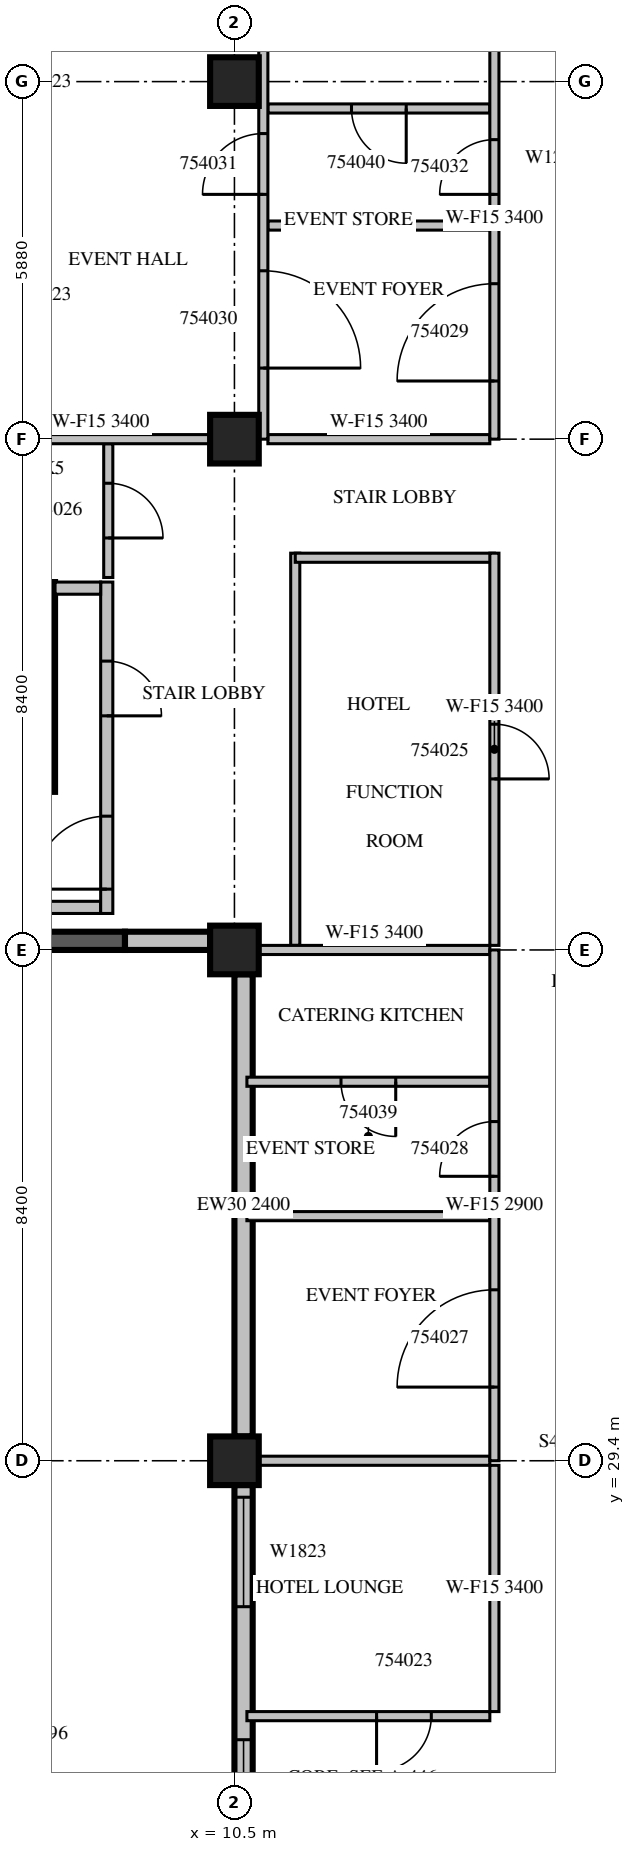
"""IFC4 building model, lengths in metres.
Left out: names, types, materials, properties, quantities, classifications, styles, units other than length and angle.
Written with IfcOpenShell. Run it as: python <this file> out.ifc"""

import sys

from ifc_helpers import new_model, si_unit, direction, frame, frame_2d, origin, origin_2d, place, context, subcontext, project, spatial, rectangle, extrude, source, transform, mapped, element, fill, save


model = new_model("IFC4")
c1 = context("Model", 3, precision=1e-05, world=origin(), true_north=direction((0.0, 1.0)))
c2 = subcontext(c1, "Body", "Model", "MODEL_VIEW")
j1 = project(units=[si_unit("LENGTHUNIT", "METRE"), si_unit("PLANEANGLEUNIT", "RADIAN")], contexts=[c1])
p1 = place(None, origin())
s1 = spatial("IfcSite", under=j1, at=p1, CompositionType="ELEMENT")
p2 = place(p1, origin())
s2 = spatial("IfcBuilding", under=s1, at=p2, CompositionType="ELEMENT")
p3 = place(p2, frame((0.0, 0.0, 238.6)))
s3 = spatial("IfcBuildingStorey", under=s2, at=p3, CompositionType="ELEMENT", Elevation=238.6)
m1 = source(origin(), c2, "Body", "SweptSolid", [
    extrude(rectangle(XDim=0.8, YDim=0.8, at=origin_2d()), origin(), (0.0, 0.0, 1.0), 3.8),
])
for number, where, z_axis, x_axis in (
    (1, (10.5, 29.4, 0.0), (0.0, 0.0, 1.0), (1.0, 0.0, 0.0)),
    (2, (10.5, 37.8, 0.0), (0.0, 0.0, 1.0), (1.0, 0.0, 0.0)),
    (3, (10.5, 46.2, 0.0), (0.0, 0.0, 1.0), (1.0, 0.0, 0.0)),
    (4, (10.5, 52.08, 0.0), (0.0, 0.0, 1.0), (1.0, 0.0, 0.0)),
):
    element("IfcColumn", number, at=place(p3, frame(where, z_axis=z_axis, x_axis=x_axis)), inside=s3, PredefinedType="COLUMN", context=c2, shape_type="MappedRepresentation", body=[
        mapped(m1, transform((0.0, 0.0, 0.0), scale=1.0)),
    ])
m2 = source(origin(), c2, "Body", "SweptSolid", [
    extrude(rectangle(XDim=2.1, YDim=0.3, at=frame_2d((1.05, 0.0))), origin(), (0.0, 0.0, 1.0), 3.4),
])
p4 = place(p3, frame((6.6, 37.95, 0.0), z_axis=(0.0, 0.0, 1.0), x_axis=(1.0, 0.0, 0.0)))
e5 = element("IfcWall", 5, at=p4, inside=s3, PredefinedType="SOLIDWALL", context=c2, shape_type="MappedRepresentation", body=[
    mapped(m2, transform((0.0, 0.0, 0.0), scale=1.0)),
])
m3 = source(origin(), c2, "Body", "SweptSolid", [
    extrude(rectangle(XDim=1.4, YDim=0.3, at=frame_2d((0.7, 0.0))), origin(), (0.0, 0.0, 1.0), 3.4),
])
p5 = place(p3, frame((8.7, 37.95, 0.0), z_axis=(0.0, 0.0, 1.0), x_axis=(1.0, 0.0, 0.0)))
e6 = element("IfcWall", 6, at=p5, inside=s3, PredefinedType="STANDARD", context=c2, shape_type="MappedRepresentation", body=[
    mapped(m3, transform((0.0, 0.0, 0.0), scale=1.0)),
])
m4 = source(origin(), c2, "Body", "SweptSolid", [
    extrude(rectangle(XDim=7.6, YDim=0.3, at=frame_2d((3.8, 0.0))), origin(), (0.0, 0.0, 1.0), 2.4),
])
p6 = place(p3, frame((10.65, 37.4, 0.0), z_axis=(0.0, 0.0, 1.0), x_axis=(0.0, -1.0, 0.0)))
e7 = element("IfcWall", 7, at=p6, inside=s3, PredefinedType="STANDARD", context=c2, shape_type="MappedRepresentation", body=[
    mapped(m4, transform((0.0, 0.0, 0.0), scale=1.0)),
])
m5 = source(origin(), c2, "Body", "SweptSolid", [
    extrude(rectangle(XDim=7.2, YDim=0.3, at=frame_2d((3.6, 0.0))), origin(), (0.0, 0.0, 1.0), 3.4),
])
p7 = place(p3, frame((10.65, 29.0, 0.0), z_axis=(0.0, 0.0, 1.0), x_axis=(0.0, -1.0, 0.0)))
e8 = element("IfcWall", 8, at=p7, inside=s3, PredefinedType="STANDARD", context=c2, shape_type="MappedRepresentation", body=[
    mapped(m5, transform((0.0, 0.0, 0.0), scale=1.0)),
])
m6 = source(origin(), c2, "Body", "SweptSolid", [
    extrude(rectangle(XDim=1.8, YDim=2.3, at=frame_2d((0.9, 1.15))), frame((0.0, 0.16, 0.0), z_axis=(0.0, -1.0, 0.0), x_axis=(1.0, 0.0, 0.0)), (0.0, 0.0, 1.0), 0.32),
])
p8 = place(p7, frame((0.2, 0.0, 0.6)))
e9 = element("IfcOpeningElement", 9, at=p8, cuts=e8, PredefinedType="OPENING", context=c2, shape_type="MappedRepresentation", body=[
    mapped(m6, transform((0.0, 0.0, 0.0), scale=1.0)),
])
m7 = source(origin(), c2, "Body", "SweptSolid", [
    extrude(rectangle(XDim=2.4, YDim=2.3, at=frame_2d((1.2, 1.15))), frame((0.0, 0.16, 0.0), z_axis=(0.0, -1.0, 0.0), x_axis=(1.0, 0.0, 0.0)), (0.0, 0.0, 1.0), 0.32),
])
p9 = place(p7, frame((4.188, 0.0, 0.6)))
e10 = element("IfcOpeningElement", 10, at=p9, cuts=e8, PredefinedType="OPENING", context=c2, shape_type="MappedRepresentation", body=[
    mapped(m7, transform((0.0, 0.0, 0.0), scale=1.0)),
])
m8 = source(origin(), c2, "Body", "SweptSolid", [
    extrude(rectangle(XDim=3.45, YDim=0.25, at=frame_2d((1.725, 0.0))), origin(), (0.0, 0.0, 1.0), 3.4),
])
p10 = place(p3, frame((7.425, 40.4, 0.0), z_axis=(0.0, 0.0, 1.0), x_axis=(0.0, 1.0, 0.0)))
e11 = element("IfcWall", 11, at=p10, inside=s3, PredefinedType="SOLIDWALL", context=c2, shape_type="MappedRepresentation", body=[
    mapped(m8, transform((0.0, 0.0, 0.0), scale=1.0)),
])
m9 = source(origin(), c2, "Body", "SweptSolid", [
    extrude(rectangle(XDim=2.0, YDim=0.2, at=frame_2d((1.0, 0.0))), origin(), (0.0, 0.0, 1.0), 3.4),
])
p11 = place(p3, frame((6.3, 38.5, 0.0), z_axis=(0.0, 0.0, 1.0), x_axis=(1.0, 0.0, 0.0)))
e12 = element("IfcWall", 12, at=p11, inside=s3, PredefinedType="PARTITIONING", context=c2, shape_type="MappedRepresentation", body=[
    mapped(m9, transform((0.0, 0.0, 0.0), scale=1.0)),
])
m10 = source(origin(), c2, "Body", "SweptSolid", [
    extrude(rectangle(XDim=5.45, YDim=0.2, at=frame_2d((2.725, 0.0))), origin(), (0.0, 0.0, 1.0), 3.4),
])
p12 = place(p3, frame((8.4, 38.4, 0.0), z_axis=(0.0, 0.0, 1.0), x_axis=(0.0, 1.0, 0.0)))
e13 = element("IfcWall", 13, at=p12, inside=s3, PredefinedType="PARTITIONING", context=c2, shape_type="MappedRepresentation", body=[
    mapped(m10, transform((0.0, 0.0, 0.0), scale=1.0)),
])
m11 = source(origin(), c2, "Body", "SweptSolid", [
    extrude(rectangle(XDim=1.2, YDim=2.1, at=frame_2d((0.6, 1.05))), frame((0.0, 0.11, 0.0), z_axis=(0.0, -1.0, 0.0), x_axis=(1.0, 0.0, 0.0)), (0.0, 0.0, 1.0), 0.22),
])
p13 = place(p12, frame((0.4, 0.0, 0.0)))
e14 = element("IfcOpeningElement", 14, at=p13, cuts=e13, PredefinedType="OPENING", context=c2, shape_type="MappedRepresentation", body=[
    mapped(m11, transform((0.0, 0.0, 0.0), scale=1.0)),
])
m12 = source(origin(), c2, "Body", "SweptSolid", [
    extrude(rectangle(XDim=0.9, YDim=2.1, at=frame_2d((0.45, 1.05))), frame((0.0, 0.11, 0.0), z_axis=(0.0, -1.0, 0.0), x_axis=(1.0, 0.0, 0.0)), (0.0, 0.0, 1.0), 0.22),
])
p14 = place(p12, frame((3.25, 0.0, 0.0)))
e15 = element("IfcOpeningElement", 15, at=p14, cuts=e13, PredefinedType="OPENING", context=c2, shape_type="MappedRepresentation", body=[
    mapped(m12, transform((0.0, 0.0, 0.0), scale=1.0)),
])
m13 = source(origin(), c2, "Body", "SweptSolid", [
    extrude(rectangle(XDim=0.75, YDim=0.2, at=frame_2d((0.375, 0.0))), origin(), (0.0, 0.0, 1.0), 3.4),
])
p15 = place(p3, frame((7.55, 43.75, 0.0), z_axis=(0.0, 0.0, 1.0), x_axis=(1.0, 0.0, 0.0)))
e16 = element("IfcWall", 16, at=p15, inside=s3, PredefinedType="PARTITIONING", context=c2, shape_type="MappedRepresentation", body=[
    mapped(m13, transform((0.0, 0.0, 0.0), scale=1.0)),
])
m14 = source(origin(), c2, "Body", "SweptSolid", [
    extrude(rectangle(XDim=3.995, YDim=0.15, at=frame_2d((1.998, 0.0))), origin(), (0.0, 0.0, 1.0), 3.4),
])
p16 = place(p3, frame((10.705, 25.2, 0.0), z_axis=(0.0, 0.0, 1.0), x_axis=(1.0, 0.0, 0.0)))
e17 = element("IfcWall", 17, at=p16, inside=s3, PredefinedType="PARTITIONING", context=c2, shape_type="MappedRepresentation", body=[
    mapped(m14, transform((0.0, 0.0, 0.0), scale=1.0)),
])
m15 = source(origin(), c2, "Body", "SweptSolid", [
    extrude(rectangle(XDim=0.9, YDim=2.1, at=frame_2d((0.45, 1.05))), frame((0.0, 0.085, 0.0), z_axis=(0.0, -1.0, 0.0), x_axis=(1.0, 0.0, 0.0)), (0.0, 0.0, 1.0), 0.17),
])
p17 = place(p16, frame((2.132, 0.0, 0.0)))
e18 = element("IfcOpeningElement", 18, at=p17, cuts=e17, PredefinedType="OPENING", context=c2, shape_type="MappedRepresentation", body=[
    mapped(m15, transform((0.0, 0.0, 0.0), scale=1.0)),
])
m16 = source(origin(), c2, "Body", "SweptSolid", [
    extrude(rectangle(XDim=4.05, YDim=0.15, at=frame_2d((2.025, 0.0))), origin(), (0.0, 0.0, 1.0), 3.4),
])
p18 = place(p3, frame((14.775, 25.275, 0.0), z_axis=(0.0, 0.0, 1.0), x_axis=(0.0, 1.0, 0.0)))
e19 = element("IfcWall", 19, at=p18, inside=s3, PredefinedType="PARTITIONING", context=c2, shape_type="MappedRepresentation", body=[
    mapped(m16, transform((0.0, 0.0, 0.0), scale=1.0)),
])
m17 = source(origin(), c2, "Body", "SweptSolid", [
    extrude(rectangle(XDim=3.801, YDim=0.15, at=frame_2d((1.901, 0.0))), origin(), (0.0, 0.0, 1.0), 3.4),
])
p19 = place(p3, frame((14.7, 29.4, 0.0), z_axis=(0.0, 0.0, 1.0), x_axis=(-1.0, 0.0, 0.0)))
e20 = element("IfcWall", 20, at=p19, inside=s3, PredefinedType="PARTITIONING", context=c2, shape_type="MappedRepresentation", body=[
    mapped(m17, transform((0.0, 0.0, 0.0), scale=1.0)),
])
m18 = source(origin(), c2, "Body", "SweptSolid", [
    extrude(rectangle(XDim=6.45, YDim=0.15, at=frame_2d((3.225, 0.0))), origin(), (0.0, 0.0, 1.0), 3.4),
])
p20 = place(p3, frame((11.5, 44.325, 0.0), z_axis=(0.0, 0.0, 1.0), x_axis=(0.0, -1.0, 0.0)))
e21 = element("IfcWall", 21, at=p20, inside=s3, PredefinedType="PARTITIONING", context=c2, shape_type="MappedRepresentation", body=[
    mapped(m18, transform((0.0, 0.0, 0.0), scale=1.0)),
])
m19 = source(origin(), c2, "Body", "SweptSolid", [
    extrude(rectangle(XDim=3.275, YDim=0.15, at=frame_2d((1.637, 0.0))), origin(), (0.0, 0.0, 1.0), 3.4),
])
p21 = place(p3, frame((14.775, 44.25, 0.0), z_axis=(0.0, 0.0, 1.0), x_axis=(-1.0, 0.0, 0.0)))
e22 = element("IfcWall", 22, at=p21, inside=s3, PredefinedType="PARTITIONING", context=c2, shape_type="MappedRepresentation", body=[
    mapped(m19, transform((0.0, 0.0, 0.0), scale=1.0)),
])
p22 = place(p3, frame((14.775, 37.875, 0.0), z_axis=(0.0, 0.0, 1.0), x_axis=(0.0, 1.0, 0.0)))
e23 = element("IfcWall", 23, at=p22, inside=s3, PredefinedType="PARTITIONING", context=c2, shape_type="MappedRepresentation", body=[
    mapped(m18, transform((0.0, 0.0, 0.0), scale=1.0)),
])
p23 = place(p22, frame((2.737, 0.0, 0.0)))
e24 = element("IfcOpeningElement", 24, at=p23, cuts=e23, PredefinedType="OPENING", context=c2, shape_type="MappedRepresentation", body=[
    mapped(m15, transform((0.0, 0.0, 0.0), scale=1.0)),
])
m20 = source(origin(), c2, "Body", "SweptSolid", [
    extrude(rectangle(XDim=2.2, YDim=0.15, at=frame_2d((1.1, 0.0))), origin(), (0.0, 0.0, 1.0), 3.4),
])
p24 = place(p3, frame((8.425, 43.925, 0.0), z_axis=(0.0, 0.0, 1.0), x_axis=(0.0, 1.0, 0.0)))
e25 = element("IfcWall", 25, at=p24, inside=s3, PredefinedType="PARTITIONING", context=c2, shape_type="MappedRepresentation", body=[
    mapped(m20, transform((0.0, 0.0, 0.0), scale=1.0)),
])
p25 = place(p24, frame((0.65, 0.0, 0.0)))
e26 = element("IfcOpeningElement", 26, at=p25, cuts=e25, PredefinedType="OPENING", context=c2, shape_type="MappedRepresentation", body=[
    mapped(m15, transform((0.0, 0.0, 0.0), scale=1.0)),
])
p26 = place(p3, frame((14.7, 33.422, 0.0), z_axis=(0.0, 0.0, 1.0), x_axis=(-1.0, 0.0, 0.0)))
e27 = element("IfcWall", 27, at=p26, inside=s3, PredefinedType="PARTITIONING", context=c2, shape_type="MappedRepresentation", body=[
    mapped(m14, transform((0.0, 0.0, 0.0), scale=1.0)),
])
p27 = place(p3, frame((14.7, 35.633, 0.0), z_axis=(0.0, 0.0, 1.0), x_axis=(-1.0, 0.0, 0.0)))
e28 = element("IfcWall", 28, at=p27, inside=s3, PredefinedType="PARTITIONING", context=c2, shape_type="MappedRepresentation", body=[
    mapped(m14, transform((0.0, 0.0, 0.0), scale=1.0)),
])
p28 = place(p27, frame((1.548, 0.0, 0.0)))
e29 = element("IfcOpeningElement", 29, at=p28, cuts=e28, PredefinedType="OPENING", context=c2, shape_type="MappedRepresentation", body=[
    mapped(m15, transform((0.0, 0.0, 0.0), scale=1.0)),
])
p29 = place(p3, frame((14.7, 37.8, 0.0), z_axis=(0.0, 0.0, 1.0), x_axis=(-1.0, 0.0, 0.0)))
e30 = element("IfcWall", 30, at=p29, inside=s3, PredefinedType="PARTITIONING", context=c2, shape_type="MappedRepresentation", body=[
    mapped(m17, transform((0.0, 0.0, 0.0), scale=1.0)),
])
m21 = source(origin(), c2, "Body", "SweptSolid", [
    extrude(rectangle(XDim=3.65, YDim=0.15, at=frame_2d((1.825, 0.0))), origin(), (0.0, 0.0, 1.0), 3.4),
])
p30 = place(p3, frame((14.7, 49.713, 0.0), z_axis=(0.0, 0.0, 1.0), x_axis=(-1.0, 0.0, 0.0)))
e31 = element("IfcWall", 31, at=p30, inside=s3, PredefinedType="PARTITIONING", context=c2, shape_type="MappedRepresentation", body=[
    mapped(m21, transform((0.0, 0.0, 0.0), scale=1.0)),
])
p31 = place(p3, frame((14.7, 51.638, 0.0), z_axis=(0.0, 0.0, 1.0), x_axis=(-1.0, 0.0, 0.0)))
e32 = element("IfcWall", 32, at=p31, inside=s3, PredefinedType="PARTITIONING", context=c2, shape_type="MappedRepresentation", body=[
    mapped(m21, transform((0.0, 0.0, 0.0), scale=1.0)),
])
p32 = place(p31, frame((1.375, 0.0, 0.0)))
e33 = element("IfcOpeningElement", 33, at=p32, cuts=e32, PredefinedType="OPENING", context=c2, shape_type="MappedRepresentation", body=[
    mapped(m15, transform((0.0, 0.0, 0.0), scale=1.0)),
])
m22 = source(origin(), c2, "Body", "SweptSolid", [
    extrude(rectangle(XDim=3.596, YDim=0.15, at=frame_2d((1.798, 0.0))), origin(), (0.0, 0.0, 1.0), 3.4),
])
p33 = place(p3, frame((10.101, 46.2, 0.0), z_axis=(0.0, 0.0, 1.0), x_axis=(-1.0, 0.0, 0.0)))
e34 = element("IfcWall", 34, at=p33, inside=s3, PredefinedType="PARTITIONING", context=c2, shape_type="MappedRepresentation", body=[
    mapped(m22, transform((0.0, 0.0, 0.0), scale=1.0)),
])
p34 = place(p3, frame((14.7, 46.2, 0.0), z_axis=(0.0, 0.0, 1.0), x_axis=(-1.0, 0.0, 0.0)))
e35 = element("IfcWall", 35, at=p34, inside=s3, PredefinedType="PARTITIONING", context=c2, shape_type="MappedRepresentation", body=[
    mapped(m21, transform((0.0, 0.0, 0.0), scale=1.0)),
])
m23 = source(origin(), c2, "Body", "SweptSolid", [
    extrude(rectangle(XDim=7.26, YDim=0.15, at=frame_2d((3.63, 0.0))), origin(), (0.0, 0.0, 1.0), 3.4),
])
p35 = place(p3, frame((10.975, 46.2, 0.0), z_axis=(0.0, 0.0, 1.0), x_axis=(0.0, 1.0, 0.0)))
e36 = element("IfcWall", 36, at=p35, inside=s3, PredefinedType="PARTITIONING", context=c2, shape_type="MappedRepresentation", body=[
    mapped(m23, transform((0.0, 0.0, 0.0), scale=1.0)),
])
m24 = source(origin(), c2, "Body", "SweptSolid", [
    extrude(rectangle(XDim=1.6, YDim=2.1, at=frame_2d((0.8, 1.05))), frame((0.0, 0.085, 0.0), z_axis=(0.0, -1.0, 0.0), x_axis=(1.0, 0.0, 0.0)), (0.0, 0.0, 1.0), 0.17),
])
p36 = place(p35, frame((1.169, 0.0, 0.0)))
e37 = element("IfcOpeningElement", 37, at=p36, cuts=e36, PredefinedType="OPENING", context=c2, shape_type="MappedRepresentation", body=[
    mapped(m24, transform((0.0, 0.0, 0.0), scale=1.0)),
])
m25 = source(origin(), c2, "Body", "SweptSolid", [
    extrude(rectangle(XDim=1.0, YDim=2.1, at=frame_2d((0.5, 1.05))), frame((0.0, 0.085, 0.0), z_axis=(0.0, -1.0, 0.0), x_axis=(1.0, 0.0, 0.0)), (0.0, 0.0, 1.0), 0.17),
])
p37 = place(p35, frame((4.025, 0.0, 0.0)))
e38 = element("IfcOpeningElement", 38, at=p37, cuts=e36, PredefinedType="OPENING", context=c2, shape_type="MappedRepresentation", body=[
    mapped(m25, transform((0.0, 0.0, 0.0), scale=1.0)),
])
m26 = source(origin(), c2, "Body", "SweptSolid", [
    extrude(rectangle(XDim=8.4, YDim=0.15, at=frame_2d((4.2, 0.0))), origin(), (0.0, 0.0, 1.0), 2.9),
])
p38 = place(p3, frame((14.775, 29.4, 0.0), z_axis=(0.0, 0.0, 1.0), x_axis=(0.0, 1.0, 0.0)))
e39 = element("IfcWall", 39, at=p38, inside=s3, PredefinedType="PARTITIONING", context=c2, shape_type="MappedRepresentation", body=[
    mapped(m26, transform((0.0, 0.0, 0.0), scale=1.0)),
])
p39 = place(p38, frame((1.211, 0.0, 0.0)))
e40 = element("IfcOpeningElement", 40, at=p39, cuts=e39, PredefinedType="OPENING", context=c2, shape_type="MappedRepresentation", body=[
    mapped(m24, transform((0.0, 0.0, 0.0), scale=1.0)),
])
p40 = place(p38, frame((4.678, 0.0, 0.0)))
e41 = element("IfcOpeningElement", 41, at=p40, cuts=e39, PredefinedType="OPENING", context=c2, shape_type="MappedRepresentation", body=[
    mapped(m15, transform((0.0, 0.0, 0.0), scale=1.0)),
])
p41 = place(p3, frame((14.775, 46.2, 0.0), z_axis=(0.0, 0.0, 1.0), x_axis=(0.0, 1.0, 0.0)))
e42 = element("IfcWall", 42, at=p41, inside=s3, PredefinedType="PARTITIONING", context=c2, shape_type="MappedRepresentation", body=[
    mapped(m23, transform((0.0, 0.0, 0.0), scale=1.0)),
])
p42 = place(p41, frame((0.956, 0.0, 0.0)))
e43 = element("IfcOpeningElement", 43, at=p42, cuts=e42, PredefinedType="OPENING", context=c2, shape_type="MappedRepresentation", body=[
    mapped(m24, transform((0.0, 0.0, 0.0), scale=1.0)),
])
p43 = place(p41, frame((4.025, 0.0, 0.0)))
e44 = element("IfcOpeningElement", 44, at=p43, cuts=e42, PredefinedType="OPENING", context=c2, shape_type="MappedRepresentation", body=[
    mapped(m15, transform((0.0, 0.0, 0.0), scale=1.0)),
])
m27 = source(origin(), c2, "Body", "SweptSolid", [
    extrude(rectangle(XDim=1.8, YDim=2.3, at=frame_2d((0.9, 1.15))), frame((0.0, 0.03, 0.0), z_axis=(0.0, -1.0, 0.0), x_axis=(1.0, 0.0, 0.0)), (0.0, 0.0, 1.0), 0.06),
])
p44 = place(p8, origin())
e45 = element("IfcWindow", 45, at=p44, inside=s3, PartitioningType="SINGLE_PANEL", PredefinedType="WINDOW", context=c2, shape_type="MappedRepresentation", body=[
    mapped(m27, transform((0.0, 0.0, 0.0), scale=1.0)),
])
fill(e9, e45)
m28 = source(origin(), c2, "Body", "SweptSolid", [
    extrude(rectangle(XDim=2.4, YDim=2.3, at=frame_2d((1.2, 1.15))), frame((0.0, 0.03, 0.0), z_axis=(0.0, -1.0, 0.0), x_axis=(1.0, 0.0, 0.0)), (0.0, 0.0, 1.0), 0.06),
])
p45 = place(p9, origin())
e46 = element("IfcWindow", 46, at=p45, inside=s3, PartitioningType="SINGLE_PANEL", PredefinedType="WINDOW", context=c2, shape_type="MappedRepresentation", body=[
    mapped(m28, transform((0.0, 0.0, 0.0), scale=1.0)),
])
fill(e10, e46)
m29 = source(origin(), c2, "Body", "SweptSolid", [
    extrude(rectangle(XDim=1.2, YDim=2.1, at=frame_2d((0.6, 1.05))), frame((0.0, 0.025, 0.0), z_axis=(0.0, -1.0, 0.0), x_axis=(1.0, 0.0, 0.0)), (0.0, 0.0, 1.0), 0.05),
])
p46 = place(p13, origin())
e47 = element("IfcDoor", 47, at=p46, inside=s3, OperationType="SINGLE_SWING_LEFT", PredefinedType="DOOR", context=c2, shape_type="MappedRepresentation", body=[
    mapped(m29, transform((0.0, 0.0, 0.0), scale=1.0)),
])
fill(e14, e47)
m30 = source(origin(), c2, "Body", "SweptSolid", [
    extrude(rectangle(XDim=0.9, YDim=2.1, at=frame_2d((0.45, 1.05))), frame((0.0, 0.025, 0.0), z_axis=(0.0, -1.0, 0.0), x_axis=(1.0, 0.0, 0.0)), (0.0, 0.0, 1.0), 0.05),
])
p47 = place(p14, origin())
e48 = element("IfcDoor", 48, at=p47, inside=s3, OperationType="SINGLE_SWING_RIGHT", PredefinedType="DOOR", context=c2, shape_type="MappedRepresentation", body=[
    mapped(m30, transform((0.0, 0.0, 0.0), scale=1.0)),
])
fill(e15, e48)
p48 = place(p17, origin())
e49 = element("IfcDoor", 49, at=p48, inside=s3, OperationType="SINGLE_SWING_RIGHT", PredefinedType="DOOR", context=c2, shape_type="MappedRepresentation", body=[
    mapped(m30, transform((0.0, 0.0, 0.0), scale=1.0)),
])
fill(e18, e49)
p49 = place(p23, origin())
e50 = element("IfcDoor", 50, at=p49, inside=s3, OperationType="SINGLE_SWING_RIGHT", PredefinedType="DOOR", context=c2, shape_type="MappedRepresentation", body=[
    mapped(m30, transform((0.0, 0.0, 0.0), scale=1.0)),
])
fill(e24, e50)
p50 = place(p25, origin())
e51 = element("IfcDoor", 51, at=p50, inside=s3, OperationType="SINGLE_SWING_RIGHT", PredefinedType="DOOR", context=c2, shape_type="MappedRepresentation", body=[
    mapped(m30, transform((0.0, 0.0, 0.0), scale=1.0)),
])
fill(e26, e51)
m31 = source(origin(), c2, "Body", "SweptSolid", [
    extrude(rectangle(XDim=1.6, YDim=2.1, at=frame_2d((0.8, 1.05))), frame((0.0, 0.025, 0.0), z_axis=(0.0, -1.0, 0.0), x_axis=(1.0, 0.0, 0.0)), (0.0, 0.0, 1.0), 0.05),
])
p51 = place(p39, origin())
e52 = element("IfcDoor", 52, at=p51, inside=s3, OperationType="SINGLE_SWING_LEFT", PredefinedType="DOOR", context=c2, shape_type="MappedRepresentation", body=[
    mapped(m31, transform((0.0, 0.0, 0.0), scale=1.0)),
])
fill(e40, e52)
p52 = place(p40, origin())
e53 = element("IfcDoor", 53, at=p52, inside=s3, OperationType="SINGLE_SWING_LEFT", PredefinedType="DOOR", context=c2, shape_type="MappedRepresentation", body=[
    mapped(m30, transform((0.0, 0.0, 0.0), scale=1.0)),
])
fill(e41, e53)
p53 = place(p42, origin())
e54 = element("IfcDoor", 54, at=p53, inside=s3, OperationType="SINGLE_SWING_LEFT", PredefinedType="DOOR", context=c2, shape_type="MappedRepresentation", body=[
    mapped(m31, transform((0.0, 0.0, 0.0), scale=1.0)),
])
fill(e43, e54)
p54 = place(p36, origin())
e55 = element("IfcDoor", 55, at=p54, inside=s3, OperationType="SINGLE_SWING_RIGHT", PredefinedType="DOOR", context=c2, shape_type="MappedRepresentation", body=[
    mapped(m31, transform((0.0, 0.0, 0.0), scale=1.0)),
])
fill(e37, e55)
m32 = source(origin(), c2, "Body", "SweptSolid", [
    extrude(rectangle(XDim=1.0, YDim=2.1, at=frame_2d((0.5, 1.05))), frame((0.0, 0.025, 0.0), z_axis=(0.0, -1.0, 0.0), x_axis=(1.0, 0.0, 0.0)), (0.0, 0.0, 1.0), 0.05),
])
p55 = place(p37, origin())
e56 = element("IfcDoor", 56, at=p55, inside=s3, OperationType="SINGLE_SWING_LEFT", PredefinedType="DOOR", context=c2, shape_type="MappedRepresentation", body=[
    mapped(m32, transform((0.0, 0.0, 0.0), scale=1.0)),
])
fill(e38, e56)
p56 = place(p43, origin())
e57 = element("IfcDoor", 57, at=p56, inside=s3, OperationType="SINGLE_SWING_LEFT", PredefinedType="DOOR", context=c2, shape_type="MappedRepresentation", body=[
    mapped(m30, transform((0.0, 0.0, 0.0), scale=1.0)),
])
fill(e44, e57)
p57 = place(p28, origin())
e58 = element("IfcDoor", 58, at=p57, inside=s3, OperationType="SINGLE_SWING_LEFT", PredefinedType="DOOR", context=c2, shape_type="MappedRepresentation", body=[
    mapped(m30, transform((0.0, 0.0, 0.0), scale=1.0)),
])
fill(e29, e58)
p58 = place(p32, origin())
e59 = element("IfcDoor", 59, at=p58, inside=s3, OperationType="SINGLE_SWING_LEFT", PredefinedType="DOOR", context=c2, shape_type="MappedRepresentation", body=[
    mapped(m30, transform((0.0, 0.0, 0.0), scale=1.0)),
])
fill(e33, e59)
save(model, sys.argv[1])
